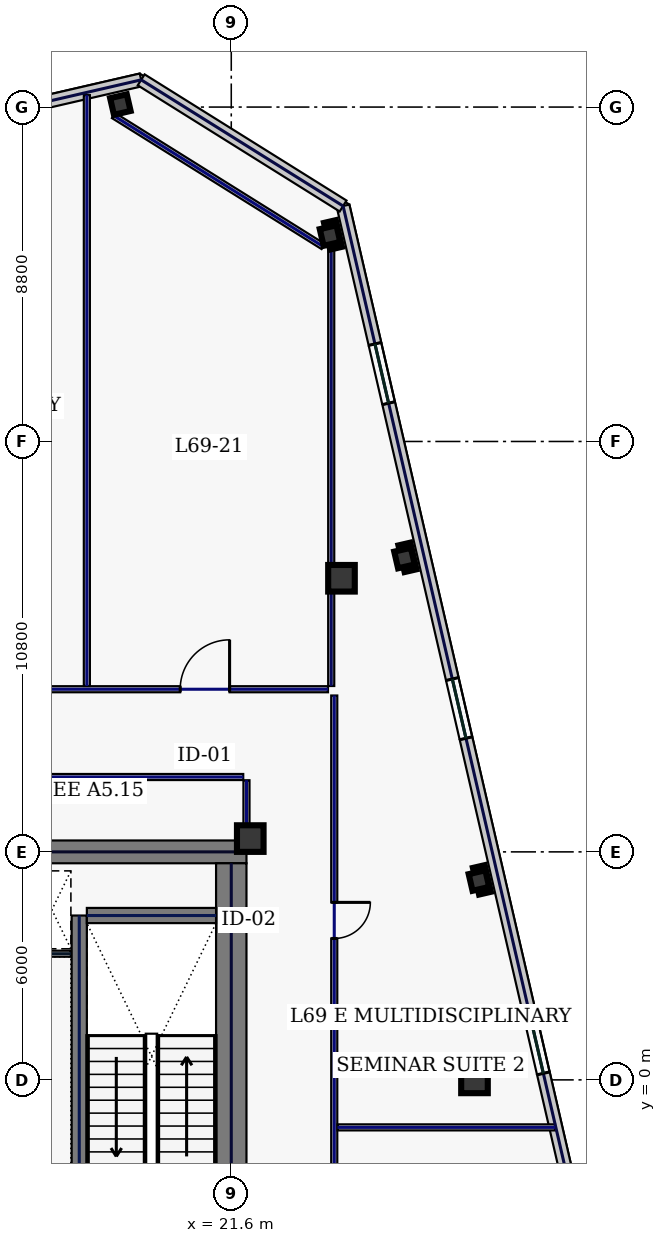
"""IFC4 building model, lengths in metres.
Left out: names, types, materials, properties, quantities, classifications, styles, units other than length and angle.
Written with IfcOpenShell. Run it as: python <this file> out.ifc"""

import sys

from ifc_helpers import new_model, si_unit, direction, frame, frame_2d, origin, origin_2d, place, context, subcontext, project, spatial, rectangle, hollow_rectangle, extrude, element, fill, save


model = new_model("IFC4")
c1 = context("Model", 3, precision=1e-05, world=origin(), true_north=direction((0.0, 1.0)))
c2 = subcontext(c1, "Body", "Model", "MODEL_VIEW")
j1 = project(units=[si_unit("LENGTHUNIT", "METRE"), si_unit("PLANEANGLEUNIT", "RADIAN")], contexts=[c1])
p1 = place(None, origin())
s1 = spatial("IfcSite", under=j1, at=p1, CompositionType="ELEMENT")
p2 = place(p1, origin())
s2 = spatial("IfcBuilding", under=s1, at=p2, CompositionType="ELEMENT")
p3 = place(p2, frame((0.0, 0.0, 297.0)))
s3 = spatial("IfcBuildingStorey", under=s2, at=p3, CompositionType="ELEMENT", Elevation=297.0)
p4 = place(p3, frame((10.5, 6.0, 0.0), z_axis=(0.0, 0.0, 1.0), x_axis=(1.0, 0.0, 0.0)))
e1 = element("IfcWall", 1, at=p4, inside=s3, PredefinedType="SHEAR", context=c2, shape_type="SweptSolid", body=[
    extrude(rectangle(XDim=11.5, YDim=0.6, at=frame_2d((5.75, 0.0))), origin(), (0.0, 0.0, 1.0), 3.74),
])
p5 = place(p3, frame((21.6, -5.7, 0.0), z_axis=(0.0, 0.0, 1.0), x_axis=(0.0, 1.0, 0.0)))
e2 = element("IfcWall", 2, at=p5, inside=s3, PredefinedType="SHEAR", context=c2, shape_type="SweptSolid", body=[
    extrude(rectangle(XDim=11.4, YDim=0.8, at=frame_2d((5.7, 0.0))), origin(), (0.0, 0.0, 1.0), 3.74),
])
p6 = place(p3, frame((17.6, -4.325, 0.0), z_axis=(0.0, 0.0, 1.0), x_axis=(0.0, 1.0, 0.0)))
e3 = element("IfcWall", 3, at=p6, inside=s3, PredefinedType="SHEAR", context=c2, shape_type="SweptSolid", body=[
    extrude(rectangle(XDim=8.65, YDim=0.4, at=frame_2d((4.325, 0.0))), origin(), (0.0, 0.0, 1.0), 3.74),
])
p7 = place(p6, frame((0.25, 0.0, 0.0)))
e4 = element("IfcOpeningElement", 4, at=p7, cuts=e3, PredefinedType="OPENING", context=c2, shape_type="SweptSolid", body=[
    extrude(rectangle(XDim=1.1, YDim=2.2, at=frame_2d((0.55, 1.1))), frame((0.0, 0.21, 0.0), z_axis=(0.0, -1.0, 0.0), x_axis=(1.0, 0.0, 0.0)), (0.0, 0.0, 1.0), 0.42),
])
p8 = place(p3, frame((17.8, 4.325, 0.0), z_axis=(0.0, 0.0, 1.0), x_axis=(1.0, 0.0, 0.0)))
e5 = element("IfcWall", 5, at=p8, inside=s3, PredefinedType="SHEAR", context=c2, shape_type="SweptSolid", body=[
    extrude(rectangle(XDim=3.4, YDim=0.4, at=frame_2d((1.7, 0.0))), origin(), (0.0, 0.0, 1.0), 3.74),
])
for number, where, z_axis, x_axis in (
    (6, (22.1, 6.35, 0.0), (0.0, 0.0, 1.0), (1.0, 0.0, 0.0)),
    (7, (24.5, 13.2, 0.0), (0.0, 0.0, 1.0), (1.0, 0.0, 0.0)),
    (8, (28.0, 0.0, 0.0), (0.0, 0.0, 1.0), (1.0, 0.0, 0.0)),
):
    element("IfcColumn", number, at=place(p3, frame(where, z_axis=z_axis, x_axis=x_axis)), inside=s3, PredefinedType="COLUMN", context=c2, shape_type="SweptSolid", body=[
        extrude(hollow_rectangle(XDim=0.7, YDim=0.7, WallThickness=0.032, at=origin_2d()), origin(), (0.0, 0.0, 1.0), 3.74),
    ])
for number, where, z_axis, x_axis in (
    (9, (18.682, 25.666, 0.0), (0.0, 0.0, 1.0), (0.974, 0.225, 0.0)),
    (10, (28.117, 5.246, 0.0), (0.0, 0.0, 1.0), (0.974, 0.225, 0.0)),
    (11, (26.158, 13.732, 0.0), (0.0, 0.0, 1.0), (0.974, 0.225, 0.0)),
    (12, (24.198, 22.219, 0.0), (0.0, 0.0, 1.0), (0.974, 0.225, 0.0)),
):
    element("IfcColumn", number, at=place(p3, frame(where, z_axis=z_axis, x_axis=x_axis)), inside=s3, PredefinedType="COLUMN", context=c2, shape_type="SweptSolid", body=[
        extrude(hollow_rectangle(XDim=0.45, YDim=0.45, WallThickness=0.022, at=origin_2d()), origin(), (0.0, 0.0, 1.0), 3.74),
    ])
p9 = place(p3, frame((19.229, 26.316, 0.0), z_axis=(0.0, 0.0, 1.0), x_axis=(-0.974372473594, -0.224940620392, 0.0)))
e13 = element("IfcWall", 13, at=p9, inside=s3, PredefinedType="STANDARD", context=c2, shape_type="SweptSolid", body=[
    extrude(rectangle(XDim=17.366, YDim=0.34, at=frame_2d((8.683, 0.0))), origin(), (0.0, 0.0, 1.0), 3.74),
])
p10 = place(p9, frame((13.187, 0.0, 1.0)))
e14 = element("IfcOpeningElement", 14, at=p10, cuts=e13, PredefinedType="OPENING", context=c2, shape_type="SweptSolid", body=[
    extrude(rectangle(XDim=1.4, YDim=1.85, at=frame_2d((0.7, 0.925))), frame((0.0, 0.18, 0.0), z_axis=(0.0, -1.0, 0.0), x_axis=(1.0, 0.0, 0.0)), (0.0, 0.0, 1.0), 0.36),
])
p11 = place(p9, frame((9.676, 0.0, 1.0)))
e15 = element("IfcOpeningElement", 15, at=p11, cuts=e13, PredefinedType="OPENING", context=c2, shape_type="SweptSolid", body=[
    extrude(rectangle(XDim=1.4, YDim=1.85, at=frame_2d((0.7, 0.925))), frame((0.0, 0.18, 0.0), z_axis=(0.0, -1.0, 0.0), x_axis=(1.0, 0.0, 0.0)), (0.0, 0.0, 1.0), 0.36),
])
p12 = place(p9, frame((5.553, 0.0, 1.0)))
e16 = element("IfcOpeningElement", 16, at=p12, cuts=e13, PredefinedType="OPENING", context=c2, shape_type="SweptSolid", body=[
    extrude(rectangle(XDim=1.4, YDim=1.85, at=frame_2d((0.7, 0.925))), frame((0.0, 0.18, 0.0), z_axis=(0.0, -1.0, 0.0), x_axis=(1.0, 0.0, 0.0)), (0.0, 0.0, 1.0), 0.36),
])
p13 = place(p9, frame((2.591, 0.0, 1.0)))
e17 = element("IfcOpeningElement", 17, at=p13, cuts=e13, PredefinedType="OPENING", context=c2, shape_type="SweptSolid", body=[
    extrude(rectangle(XDim=0.85, YDim=1.85, at=frame_2d((0.425, 0.925))), frame((0.0, 0.18, 0.0), z_axis=(0.0, -1.0, 0.0), x_axis=(1.0, 0.0, 0.0)), (0.0, 0.0, 1.0), 0.36),
])
p14 = place(p3, frame((32.686, -12.276, 0.0), z_axis=(0.0, 0.0, 1.0), x_axis=(-0.224953091034, 0.974369594576, 0.0)))
e18 = element("IfcWall", 18, at=p14, inside=s3, PredefinedType="STANDARD", context=c2, shape_type="SweptSolid", body=[
    extrude(rectangle(XDim=36.2, YDim=0.34, at=frame_2d((18.1, 0.0))), origin(), (0.0, 0.0, 1.0), 3.74),
])
p15 = place(p14, frame((3.725, 0.0, 0.58)))
e19 = element("IfcOpeningElement", 19, at=p15, cuts=e18, PredefinedType="OPENING", context=c2, shape_type="SweptSolid", body=[
    extrude(rectangle(XDim=1.6, YDim=2.3, at=frame_2d((0.8, 1.15))), frame((0.0, 0.18, 0.0), z_axis=(0.0, -1.0, 0.0), x_axis=(1.0, 0.0, 0.0)), (0.0, 0.0, 1.0), 0.36),
])
p16 = place(p14, frame((12.775, 0.0, 0.58)))
e20 = element("IfcOpeningElement", 20, at=p16, cuts=e18, PredefinedType="OPENING", context=c2, shape_type="SweptSolid", body=[
    extrude(rectangle(XDim=1.6, YDim=2.3, at=frame_2d((0.8, 1.15))), frame((0.0, 0.18, 0.0), z_axis=(0.0, -1.0, 0.0), x_axis=(1.0, 0.0, 0.0)), (0.0, 0.0, 1.0), 0.36),
])
p17 = place(p14, frame((21.825, 0.0, 0.58)))
e21 = element("IfcOpeningElement", 21, at=p17, cuts=e18, PredefinedType="OPENING", context=c2, shape_type="SweptSolid", body=[
    extrude(rectangle(XDim=1.6, YDim=2.3, at=frame_2d((0.8, 1.15))), frame((0.0, 0.18, 0.0), z_axis=(0.0, -1.0, 0.0), x_axis=(1.0, 0.0, 0.0)), (0.0, 0.0, 1.0), 0.36),
])
p18 = place(p14, frame((30.875, 0.0, 0.58)))
e22 = element("IfcOpeningElement", 22, at=p18, cuts=e18, PredefinedType="OPENING", context=c2, shape_type="SweptSolid", body=[
    extrude(rectangle(XDim=1.6, YDim=2.3, at=frame_2d((0.8, 1.15))), frame((0.0, 0.18, 0.0), z_axis=(0.0, -1.0, 0.0), x_axis=(1.0, 0.0, 0.0)), (0.0, 0.0, 1.0), 0.36),
])
p19 = place(p3, frame((24.542, 22.996, 0.0), z_axis=(0.0, 0.0, 1.0), x_axis=(-0.848055220921, 0.529907862057, 0.0)))
e23 = element("IfcWall", 23, at=p19, inside=s3, PredefinedType="STANDARD", context=c2, shape_type="SweptSolid", body=[
    extrude(rectangle(XDim=6.265, YDim=0.34, at=frame_2d((3.132, 0.0))), origin(), (0.0, 0.0, 1.0), 3.74),
])
p20 = place(p3, frame((15.725, 3.32, 0.0), z_axis=(0.0, 0.0, 1.0), x_axis=(1.0, 0.0, 0.0)))
e24 = element("IfcWall", 24, at=p20, inside=s3, PredefinedType="PARTITIONING", context=c2, shape_type="SweptSolid", body=[
    extrude(rectangle(XDim=1.655, YDim=0.16, at=frame_2d((0.827, 0.0))), origin(), (0.0, 0.0, 1.0), 3.74),
])
p21 = place(p3, frame((24.018, 21.931, 0.0), z_axis=(0.0, 0.0, 1.0), x_axis=(-0.848051009591, 0.529914601736, 0.0)))
e25 = element("IfcWall", 25, at=p21, inside=s3, PredefinedType="PARTITIONING", context=c2, shape_type="SweptSolid", body=[
    extrude(rectangle(XDim=6.505, YDim=0.16, at=frame_2d((3.253, 0.0))), origin(), (0.0, 0.0, 1.0), 3.74),
])
p22 = place(p3, frame((-24.145, 10.28, 0.0), z_axis=(0.0, 0.0, 1.0), x_axis=(1.0, 0.0, 0.0)))
e26 = element("IfcWall", 26, at=p22, inside=s3, PredefinedType="PARTITIONING", context=c2, shape_type="SweptSolid", body=[
    extrude(rectangle(XDim=48.29, YDim=0.16, at=frame_2d((24.145, 0.0))), origin(), (0.0, 0.0, 1.0), 3.74),
])
p23 = place(p22, frame((2.044, 0.0, 0.0)))
e27 = element("IfcOpeningElement", 27, at=p23, cuts=e26, PredefinedType="OPENING", context=c2, shape_type="SweptSolid", body=[
    extrude(rectangle(XDim=0.95, YDim=2.2, at=frame_2d((0.475, 1.1))), frame((0.0, 0.09, 0.0), z_axis=(0.0, -1.0, 0.0), x_axis=(1.0, 0.0, 0.0)), (0.0, 0.0, 1.0), 0.18),
])
p24 = place(p22, frame((6.885, 0.0, 0.0)))
e28 = element("IfcOpeningElement", 28, at=p24, cuts=e26, PredefinedType="OPENING", context=c2, shape_type="SweptSolid", body=[
    extrude(rectangle(XDim=0.95, YDim=2.2, at=frame_2d((0.475, 1.1))), frame((0.0, 0.09, 0.0), z_axis=(0.0, -1.0, 0.0), x_axis=(1.0, 0.0, 0.0)), (0.0, 0.0, 1.0), 0.18),
])
p25 = place(p22, frame((14.8, 0.0, 0.0)))
e29 = element("IfcOpeningElement", 29, at=p25, cuts=e26, PredefinedType="OPENING", context=c2, shape_type="SweptSolid", body=[
    extrude(rectangle(XDim=1.3, YDim=2.2, at=frame_2d((0.65, 1.1))), frame((0.0, 0.09, 0.0), z_axis=(0.0, -1.0, 0.0), x_axis=(1.0, 0.0, 0.0)), (0.0, 0.0, 1.0), 0.18),
])
p26 = place(p22, frame((25.58, 0.0, 0.0)))
e30 = element("IfcOpeningElement", 30, at=p26, cuts=e26, PredefinedType="OPENING", context=c2, shape_type="SweptSolid", body=[
    extrude(rectangle(XDim=1.3, YDim=2.2, at=frame_2d((0.65, 1.1))), frame((0.0, 0.09, 0.0), z_axis=(0.0, -1.0, 0.0), x_axis=(1.0, 0.0, 0.0)), (0.0, 0.0, 1.0), 0.18),
])
p27 = place(p22, frame((36.355, 0.0, 0.0)))
e31 = element("IfcOpeningElement", 31, at=p27, cuts=e26, PredefinedType="OPENING", context=c2, shape_type="SweptSolid", body=[
    extrude(rectangle(XDim=0.95, YDim=2.2, at=frame_2d((0.475, 1.1))), frame((0.0, 0.09, 0.0), z_axis=(0.0, -1.0, 0.0), x_axis=(1.0, 0.0, 0.0)), (0.0, 0.0, 1.0), 0.18),
])
p28 = place(p22, frame((44.401, 0.0, 0.0)))
e32 = element("IfcOpeningElement", 32, at=p28, cuts=e26, PredefinedType="OPENING", context=c2, shape_type="SweptSolid", body=[
    extrude(rectangle(XDim=1.3, YDim=2.2, at=frame_2d((0.65, 1.1))), frame((0.0, 0.09, 0.0), z_axis=(0.0, -1.0, 0.0), x_axis=(1.0, 0.0, 0.0)), (0.0, 0.0, 1.0), 0.18),
])
p29 = place(p3, frame((24.31, 10.115, 0.0), z_axis=(0.0, 0.0, 1.0), x_axis=(0.0, -1.0, 0.0)))
e33 = element("IfcWall", 33, at=p29, inside=s3, PredefinedType="PARTITIONING", context=c2, shape_type="SweptSolid", body=[
    extrude(rectangle(XDim=20.13, YDim=0.16, at=frame_2d((10.065, 0.0))), origin(), (0.0, 0.0, 1.0), 3.74),
])
p30 = place(p29, frame((15.206, 0.0, 0.0)))
e34 = element("IfcOpeningElement", 34, at=p30, cuts=e33, PredefinedType="OPENING", context=c2, shape_type="SweptSolid", body=[
    extrude(rectangle(XDim=0.95, YDim=2.2, at=frame_2d((0.475, 1.1))), frame((0.0, 0.09, 0.0), z_axis=(0.0, -1.0, 0.0), x_axis=(1.0, 0.0, 0.0)), (0.0, 0.0, 1.0), 0.18),
])
p31 = place(p29, frame((5.444, 0.0, 0.0)))
e35 = element("IfcOpeningElement", 35, at=p31, cuts=e33, PredefinedType="OPENING", context=c2, shape_type="SweptSolid", body=[
    extrude(rectangle(XDim=0.95, YDim=2.2, at=frame_2d((0.475, 1.1))), frame((0.0, 0.09, 0.0), z_axis=(0.0, -1.0, 0.0), x_axis=(1.0, 0.0, 0.0)), (0.0, 0.0, 1.0), 0.18),
])
p32 = place(p3, frame((21.915, 7.97, 0.0), z_axis=(0.0, 0.0, 1.0), x_axis=(-1.0, 0.0, 0.0)))
e36 = element("IfcWall", 36, at=p32, inside=s3, PredefinedType="PARTITIONING", context=c2, shape_type="SweptSolid", body=[
    extrude(rectangle(XDim=11.2, YDim=0.16, at=frame_2d((5.6, 0.0))), origin(), (0.0, 0.0, 1.0), 3.74),
])
p33 = place(p3, frame((22.0, 6.42, 0.0), z_axis=(0.0, 0.0, 1.0), x_axis=(0.0, 1.0, 0.0)))
e37 = element("IfcWall", 37, at=p33, inside=s3, PredefinedType="PARTITIONING", context=c2, shape_type="SweptSolid", body=[
    extrude(rectangle(XDim=1.465, YDim=0.16, at=frame_2d((0.732, 0.0))), origin(), (0.0, 0.0, 1.0), 3.74),
])
p34 = place(p3, frame((24.23, 10.365, 0.0), z_axis=(0.0, 0.0, 1.0), x_axis=(0.0, 1.0, 0.0)))
e38 = element("IfcWall", 38, at=p34, inside=s3, PredefinedType="PARTITIONING", context=c2, shape_type="SweptSolid", body=[
    extrude(rectangle(XDim=12.206, YDim=0.16, at=frame_2d((6.103, 0.0))), origin(), (0.0, 0.0, 1.0), 3.185),
])
p35 = place(p3, frame((17.8, 10.365, 0.0), z_axis=(0.0, 0.0, 1.0), x_axis=(0.0, 1.0, 0.0)))
e39 = element("IfcWall", 39, at=p35, inside=s3, PredefinedType="PARTITIONING", context=c2, shape_type="SweptSolid", body=[
    extrude(rectangle(XDim=15.549, YDim=0.16, at=frame_2d((7.775, 0.0))), origin(), (0.0, 0.0, 1.0), 3.74),
])
p36 = place(p3, frame((24.395, -1.25, 0.0), z_axis=(0.0, 0.0, 1.0), x_axis=(1.0, 0.0, 0.0)))
e40 = element("IfcWall", 40, at=p36, inside=s3, PredefinedType="PARTITIONING", context=c2, shape_type="SweptSolid", body=[
    extrude(rectangle(XDim=5.725, YDim=0.16, at=frame_2d((2.862, 0.0))), origin(), (0.0, 0.0, 1.0), 3.74),
])
p37 = place(p16, origin())
e41 = element("IfcWindow", 41, at=p37, inside=s3, PartitioningType="SINGLE_PANEL", PredefinedType="WINDOW", context=c2, shape_type="SweptSolid", body=[
    extrude(rectangle(XDim=1.6, YDim=2.3, at=frame_2d((0.8, 1.15))), frame((0.0, 0.03, 0.0), z_axis=(0.0, -1.0, 0.0), x_axis=(1.0, 0.0, 0.0)), (0.0, 0.0, 1.0), 0.06),
])
fill(e20, e41)
p38 = place(p17, origin())
e42 = element("IfcWindow", 42, at=p38, inside=s3, PartitioningType="SINGLE_PANEL", PredefinedType="WINDOW", context=c2, shape_type="SweptSolid", body=[
    extrude(rectangle(XDim=1.6, YDim=2.3, at=frame_2d((0.8, 1.15))), frame((0.0, 0.03, 0.0), z_axis=(0.0, -1.0, 0.0), x_axis=(1.0, 0.0, 0.0)), (0.0, 0.0, 1.0), 0.06),
])
fill(e21, e42)
p39 = place(p18, origin())
e43 = element("IfcWindow", 43, at=p39, inside=s3, PartitioningType="SINGLE_PANEL", PredefinedType="WINDOW", context=c2, shape_type="SweptSolid", body=[
    extrude(rectangle(XDim=1.6, YDim=2.3, at=frame_2d((0.8, 1.15))), frame((0.0, 0.03, 0.0), z_axis=(0.0, -1.0, 0.0), x_axis=(1.0, 0.0, 0.0)), (0.0, 0.0, 1.0), 0.06),
])
fill(e22, e43)
p40 = place(p28, origin())
e44 = element("IfcDoor", 44, at=p40, inside=s3, OperationType="SINGLE_SWING_RIGHT", PredefinedType="DOOR", context=c2, shape_type="SweptSolid", body=[
    extrude(rectangle(XDim=1.3, YDim=2.2, at=frame_2d((0.65, 1.1))), frame((0.0, 0.025, 0.0), z_axis=(0.0, -1.0, 0.0), x_axis=(1.0, 0.0, 0.0)), (0.0, 0.0, 1.0), 0.05),
])
fill(e32, e44)
p41 = place(p31, origin())
e45 = element("IfcDoor", 45, at=p41, inside=s3, OperationType="SINGLE_SWING_LEFT", PredefinedType="DOOR", context=c2, shape_type="SweptSolid", body=[
    extrude(rectangle(XDim=0.95, YDim=2.2, at=frame_2d((0.475, 1.1))), frame((0.0, 0.025, 0.0), z_axis=(0.0, -1.0, 0.0), x_axis=(1.0, 0.0, 0.0)), (0.0, 0.0, 1.0), 0.05),
])
fill(e35, e45)
save(model, sys.argv[1])
